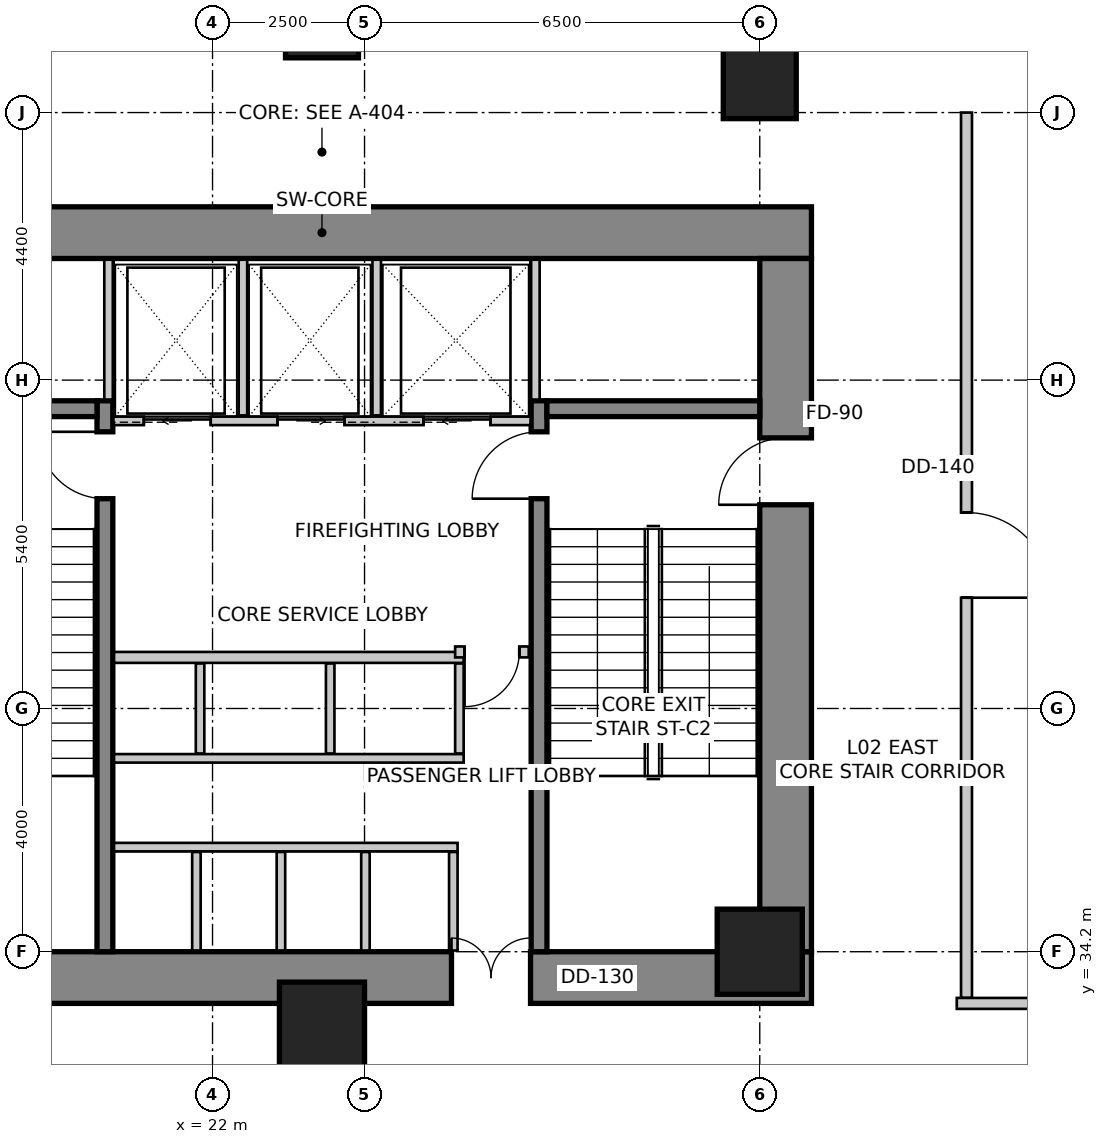
"""IFC4 building model, lengths in metres.
Left out: names, types, materials, properties, quantities, classifications, styles, units other than length and angle.
Written with IfcOpenShell. Run it as: python <this file> out.ifc"""

import sys

from ifc_helpers import new_model, si_unit, direction, frame, frame_2d, origin, origin_2d, place, context, subcontext, project, spatial, rectangle, extrude, source, transform, mapped, element, fill, save


model = new_model("IFC4")
c1 = context("Model", 3, precision=1e-05, world=origin(), true_north=direction((0.0, 1.0)))
c2 = subcontext(c1, "Body", "Model", "MODEL_VIEW")
j1 = project(units=[si_unit("LENGTHUNIT", "METRE"), si_unit("PLANEANGLEUNIT", "RADIAN")], contexts=[c1])
p1 = place(None, origin())
s1 = spatial("IfcSite", under=j1, at=p1, CompositionType="ELEMENT")
p2 = place(p1, origin())
s2 = spatial("IfcBuilding", under=s1, at=p2, CompositionType="ELEMENT")
p3 = place(p2, frame((0.0, 0.0, 6.0)))
s3 = spatial("IfcBuildingStorey", under=s2, at=p3, CompositionType="ELEMENT", Elevation=6.0)
p4 = place(p3, frame((15.75, 46.025, 0.0), z_axis=(0.0, 0.0, 1.0), x_axis=(1.0, 0.0, 0.0)))
e1 = element("IfcWall", 1, at=p4, inside=s3, PredefinedType="SHEAR", context=c2, shape_type="SweptSolid", body=[
    extrude(rectangle(XDim=16.1, YDim=0.85, at=frame_2d((8.05, 0.0))), origin(), (0.0, 0.0, 1.0), 5.2),
])
p5 = place(p3, frame((15.75, 33.775, 0.0), z_axis=(0.0, 0.0, 1.0), x_axis=(1.0, 0.0, 0.0)))
e2 = element("IfcWall", 2, at=p5, inside=s3, PredefinedType="SHEAR", context=c2, shape_type="SweptSolid", body=[
    extrude(rectangle(XDim=16.1, YDim=0.85, at=frame_2d((8.05, 0.0))), origin(), (0.0, 0.0, 1.0), 5.2),
])
m1 = source(origin(), c2, "Body", "SweptSolid", [
    extrude(rectangle(XDim=1.3, YDim=2.15, at=frame_2d((0.65, 1.075))), frame((0.0, 0.435, 0.0), z_axis=(0.0, -1.0, 0.0), x_axis=(1.0, 0.0, 0.0)), (0.0, 0.0, 1.0), 0.87),
])
p6 = place(p5, frame((10.18, 0.0, 0.0)))
e3 = element("IfcOpeningElement", 3, at=p6, cuts=e2, PredefinedType="OPENING", context=c2, shape_type="MappedRepresentation", body=[
    mapped(m1, transform((0.0, 0.0, 0.0), scale=1.0)),
])
p7 = place(p3, frame((31.425, 34.2, 0.0), z_axis=(0.0, 0.0, 1.0), x_axis=(0.0, 1.0, 0.0)))
e4 = element("IfcWall", 4, at=p7, inside=s3, PredefinedType="SHEAR", context=c2, shape_type="SweptSolid", body=[
    extrude(rectangle(XDim=11.4, YDim=0.85, at=frame_2d((5.7, 0.0))), origin(), (0.0, 0.0, 1.0), 5.2),
])
m2 = source(origin(), c2, "Body", "SweptSolid", [
    extrude(rectangle(XDim=1.1, YDim=2.15, at=frame_2d((0.55, 1.075))), frame((0.0, 0.435, 0.0), z_axis=(0.0, -1.0, 0.0), x_axis=(1.0, 0.0, 0.0)), (0.0, 0.0, 1.0), 0.87),
])
p8 = place(p7, frame((7.35, 0.0, 0.0)))
e5 = element("IfcOpeningElement", 5, at=p8, cuts=e4, PredefinedType="OPENING", context=c2, shape_type="MappedRepresentation", body=[
    mapped(m2, transform((0.0, 0.0, 0.0), scale=1.0)),
])
p9 = place(p3, frame((20.23, 34.2, 0.0), z_axis=(0.0, 0.0, 1.0), x_axis=(0.0, 1.0, 0.0)))
e6 = element("IfcWall", 6, at=p9, inside=s3, PredefinedType="SHEAR", context=c2, shape_type="SweptSolid", body=[
    extrude(rectangle(XDim=9.06, YDim=0.26, at=frame_2d((4.53, 0.0))), origin(), (0.0, 0.0, 1.0), 5.2),
])
m3 = source(origin(), c2, "Body", "SweptSolid", [
    extrude(rectangle(XDim=1.1, YDim=2.15, at=frame_2d((0.55, 1.075))), frame((0.0, 0.14, 0.0), z_axis=(0.0, -1.0, 0.0), x_axis=(1.0, 0.0, 0.0)), (0.0, 0.0, 1.0), 0.28),
])
p10 = place(p9, frame((7.45, 0.0, 0.0)))
e7 = element("IfcOpeningElement", 7, at=p10, cuts=e6, PredefinedType="OPENING", context=c2, shape_type="MappedRepresentation", body=[
    mapped(m3, transform((0.0, 0.0, 0.0), scale=1.0)),
])
p11 = place(p3, frame((27.37, 34.2, 0.0), z_axis=(0.0, 0.0, 1.0), x_axis=(0.0, 1.0, 0.0)))
e8 = element("IfcWall", 8, at=p11, inside=s3, PredefinedType="SHEAR", context=c2, shape_type="SweptSolid", body=[
    extrude(rectangle(XDim=9.06, YDim=0.26, at=frame_2d((4.53, 0.0))), origin(), (0.0, 0.0, 1.0), 5.2),
])
p12 = place(p11, frame((7.45, 0.0, 0.0)))
e9 = element("IfcOpeningElement", 9, at=p12, cuts=e8, PredefinedType="OPENING", context=c2, shape_type="MappedRepresentation", body=[
    mapped(m3, transform((0.0, 0.0, 0.0), scale=1.0)),
])
for number, where, z_axis, x_axis in (
    (10, (16.6, 43.13, 0.0), (0.0, 0.0, 1.0), (1.0, 0.0, 0.0)),
    (11, (27.5, 43.13, 0.0), (0.0, 0.0, 1.0), (1.0, 0.0, 0.0)),
):
    element("IfcWall", number, at=place(p3, frame(where, z_axis=z_axis, x_axis=x_axis)), inside=s3, PredefinedType="SHEAR", context=c2, shape_type="SweptSolid", body=[
        extrude(rectangle(XDim=3.5, YDim=0.26, at=frame_2d((1.75, 0.0))), origin(), (0.0, 0.0, 1.0), 5.2),
    ])
m4 = source(origin(), c2, "Body", "SweptSolid", [
    extrude(rectangle(XDim=1.4, YDim=1.4, at=origin_2d()), origin(), (0.0, 0.0, 1.0), 5.2),
])
for number, where, z_axis, x_axis in (
    (12, (23.8, 33.0, 0.0), (0.0, 0.0, 1.0), (1.0, 0.0, 0.0)),
    (13, (31.0, 34.2, 0.0), (0.0, 0.0, 1.0), (1.0, 0.0, 0.0)),
):
    element("IfcColumn", number, at=place(p3, frame(where, z_axis=z_axis, x_axis=x_axis)), inside=s3, PredefinedType="COLUMN", context=c2, shape_type="MappedRepresentation", body=[
        mapped(m4, transform((0.0, 0.0, 0.0), scale=1.0)),
    ])
m5 = source(origin(), c2, "Body", "SweptSolid", [
    extrude(rectangle(XDim=1.2, YDim=1.2, at=origin_2d()), origin(), (0.0, 0.0, 1.0), 5.2),
])
for number, where, z_axis, x_axis in (
    (14, (23.8, 49.5, 0.0), (0.0, 0.0, 1.0), (1.0, 0.0, 0.0)),
    (15, (31.0, 48.5, 0.0), (0.0, 0.0, 1.0), (1.0, 0.0, 0.0)),
):
    element("IfcColumn", number, at=place(p3, frame(where, z_axis=z_axis, x_axis=x_axis)), inside=s3, PredefinedType="COLUMN", context=c2, shape_type="MappedRepresentation", body=[
        mapped(m5, transform((0.0, 0.0, 0.0), scale=1.0)),
    ])
p13 = place(p3, frame((20.37, 42.93, 0.0), z_axis=(0.0, 0.0, 1.0), x_axis=(1.0, 0.0, 0.0)))
e16 = element("IfcWall", 16, at=p13, inside=s3, PredefinedType="SOLIDWALL", context=c2, shape_type="SweptSolid", body=[
    extrude(rectangle(XDim=6.86, YDim=0.14, at=frame_2d((3.43, 0.0))), origin(), (0.0, 0.0, 1.0), 4.9),
])
m6 = source(origin(), c2, "Body", "SweptSolid", [
    extrude(rectangle(XDim=1.1, YDim=2.15, at=frame_2d((0.55, 1.075))), frame((0.0, 0.08, 0.0), z_axis=(0.0, -1.0, 0.0), x_axis=(1.0, 0.0, 0.0)), (0.0, 0.0, 1.0), 0.16),
])
p14 = place(p13, frame((0.5, 0.0, 0.0)))
e17 = element("IfcOpeningElement", 17, at=p14, cuts=e16, PredefinedType="OPENING", context=c2, shape_type="MappedRepresentation", body=[
    mapped(m6, transform((0.0, 0.0, 0.0), scale=1.0)),
])
p15 = place(p13, frame((2.7, 0.0, 0.0)))
e18 = element("IfcOpeningElement", 18, at=p15, cuts=e16, PredefinedType="OPENING", context=c2, shape_type="MappedRepresentation", body=[
    mapped(m6, transform((0.0, 0.0, 0.0), scale=1.0)),
])
p16 = place(p13, frame((5.1, 0.0, 0.0)))
e19 = element("IfcOpeningElement", 19, at=p16, cuts=e16, PredefinedType="OPENING", context=c2, shape_type="MappedRepresentation", body=[
    mapped(m6, transform((0.0, 0.0, 0.0), scale=1.0)),
])
for number, where, z_axis, x_axis in (
    (20, (20.29, 43.28, 0.0), (0.0, 0.0, 1.0), (0.0, 1.0, 0.0)),
    (21, (27.31, 43.28, 0.0), (0.0, 0.0, 1.0), (0.0, 1.0, 0.0)),
):
    element("IfcWall", number, at=place(p3, frame(where, z_axis=z_axis, x_axis=x_axis)), inside=s3, PredefinedType="SOLIDWALL", context=c2, shape_type="SweptSolid", body=[
        extrude(rectangle(XDim=2.3, YDim=0.14, at=frame_2d((1.15, 0.0))), origin(), (0.0, 0.0, 1.0), 4.9),
    ])
for number, where, z_axis, x_axis in (
    (22, (22.5, 43.02, 0.0), (0.0, 0.0, 1.0), (0.0, 1.0, 0.0)),
    (23, (24.7, 43.02, 0.0), (0.0, 0.0, 1.0), (0.0, 1.0, 0.0)),
):
    element("IfcWall", number, at=place(p3, frame(where, z_axis=z_axis, x_axis=x_axis)), inside=s3, PredefinedType="SOLIDWALL", context=c2, shape_type="SweptSolid", body=[
        extrude(rectangle(XDim=2.56, YDim=0.14, at=frame_2d((1.28, 0.0))), origin(), (0.0, 0.0, 1.0), 4.9),
    ])
p17 = place(p3, frame((20.38, 35.92, 0.0), z_axis=(0.0, 0.0, 1.0), x_axis=(1.0, 0.0, 0.0)))
e24 = element("IfcWall", 24, at=p17, inside=s3, PredefinedType="SOLIDWALL", context=c2, shape_type="SweptSolid", body=[
    extrude(rectangle(XDim=5.65, YDim=0.14, at=frame_2d((2.825, 0.0))), origin(), (0.0, 0.0, 1.0), 4.9),
])
for number, where, z_axis, x_axis in (
    (25, (25.96, 34.22, 0.0), (0.0, 0.0, 1.0), (0.0, 1.0, 0.0)),
    (26, (21.735, 34.22, 0.0), (0.0, 0.0, 1.0), (0.0, 1.0, 0.0)),
    (27, (23.125, 34.22, 0.0), (0.0, 0.0, 1.0), (0.0, 1.0, 0.0)),
    (28, (24.515, 34.22, 0.0), (0.0, 0.0, 1.0), (0.0, 1.0, 0.0)),
):
    element("IfcWall", number, at=place(p3, frame(where, z_axis=z_axis, x_axis=x_axis)), inside=s3, PredefinedType="SOLIDWALL", context=c2, shape_type="SweptSolid", body=[
        extrude(rectangle(XDim=1.62, YDim=0.14, at=frame_2d((0.81, 0.0))), origin(), (0.0, 0.0, 1.0), 4.9),
    ])
p18 = place(p3, frame((20.38, 37.38, 0.0), z_axis=(0.0, 0.0, 1.0), x_axis=(1.0, 0.0, 0.0)))
e29 = element("IfcWall", 29, at=p18, inside=s3, PredefinedType="SOLIDWALL", context=c2, shape_type="SweptSolid", body=[
    extrude(rectangle(XDim=5.75, YDim=0.14, at=frame_2d((2.875, 0.0))), origin(), (0.0, 0.0, 1.0), 4.9),
])
p19 = place(p3, frame((20.38, 39.04, 0.0), z_axis=(0.0, 0.0, 1.0), x_axis=(1.0, 0.0, 0.0)))
e30 = element("IfcWall", 30, at=p19, inside=s3, PredefinedType="SOLIDWALL", context=c2, shape_type="SweptSolid", body=[
    extrude(rectangle(XDim=5.75, YDim=0.18, at=frame_2d((2.875, 0.0))), origin(), (0.0, 0.0, 1.0), 4.9),
])
for number, where, z_axis, x_axis in (
    (31, (26.06, 37.46, 0.0), (0.0, 0.0, 1.0), (0.0, 1.0, 0.0)),
    (32, (21.795, 37.46, 0.0), (0.0, 0.0, 1.0), (0.0, 1.0, 0.0)),
    (33, (23.935, 37.46, 0.0), (0.0, 0.0, 1.0), (0.0, 1.0, 0.0)),
):
    element("IfcWall", number, at=place(p3, frame(where, z_axis=z_axis, x_axis=x_axis)), inside=s3, PredefinedType="SOLIDWALL", context=c2, shape_type="SweptSolid", body=[
        extrude(rectangle(XDim=1.48, YDim=0.14, at=frame_2d((0.74, 0.0))), origin(), (0.0, 0.0, 1.0), 4.9),
    ])
p20 = place(p3, frame((27.2, 39.13, 0.0), z_axis=(0.0, 0.0, 1.0), x_axis=(-1.0, 0.0, 0.0)))
e34 = element("IfcWall", 34, at=p20, inside=s3, PredefinedType="PARTITIONING", context=c2, shape_type="SweptSolid", body=[
    extrude(rectangle(XDim=1.21, YDim=0.18, at=frame_2d((0.605, 0.0))), origin(), (0.0, 0.0, 1.0), 4.9),
])
m7 = source(origin(), c2, "Body", "SweptSolid", [
    extrude(rectangle(XDim=0.9, YDim=2.15, at=frame_2d((0.45, 1.075))), frame((0.0, 0.1, 0.0), z_axis=(0.0, -1.0, 0.0), x_axis=(1.0, 0.0, 0.0)), (0.0, 0.0, 1.0), 0.2),
])
p21 = place(p20, frame((0.155, 0.0, 0.0)))
e35 = element("IfcOpeningElement", 35, at=p21, cuts=e34, PredefinedType="OPENING", context=c2, shape_type="MappedRepresentation", body=[
    mapped(m7, transform((0.0, 0.0, 0.0), scale=1.0)),
])
p22 = place(p3, frame((34.24, 33.35, 0.0), z_axis=(0.0, 0.0, 1.0), x_axis=(1.0, 0.0, 0.0)))
e36 = element("IfcWall", 36, at=p22, inside=s3, PredefinedType="PARTITIONING", context=c2, shape_type="SweptSolid", body=[
    extrude(rectangle(XDim=33.495, YDim=0.18, at=frame_2d((16.748, 0.0))), origin(), (0.0, 0.0, 1.0), 3.092),
])
p23 = place(p3, frame((34.4, 48.0, 0.0), z_axis=(0.0, 0.0, 1.0), x_axis=(0.0, -1.0, 0.0)))
e37 = element("IfcWall", 37, at=p23, inside=s3, PredefinedType="PARTITIONING", context=c2, shape_type="SweptSolid", body=[
    extrude(rectangle(XDim=14.556, YDim=0.18, at=frame_2d((7.278, 0.0))), origin(), (0.0, 0.0, 1.0), 3.942),
])
m8 = source(origin(), c2, "Body", "SweptSolid", [
    extrude(rectangle(XDim=1.4, YDim=2.15, at=frame_2d((0.7, 1.075))), frame((0.0, 0.1, 0.0), z_axis=(0.0, -1.0, 0.0), x_axis=(1.0, 0.0, 0.0)), (0.0, 0.0, 1.0), 0.2),
])
p24 = place(p23, frame((6.578, 0.0, 0.0)))
e38 = element("IfcOpeningElement", 38, at=p24, cuts=e37, PredefinedType="OPENING", context=c2, shape_type="MappedRepresentation", body=[
    mapped(m8, transform((0.0, 0.0, 0.0), scale=1.0)),
])
m9 = source(origin(), c2, "Body", "SweptSolid", [
    extrude(rectangle(XDim=1.1, YDim=2.15, at=frame_2d((0.55, 1.075))), frame((0.0, 0.025, 0.0), z_axis=(0.0, -1.0, 0.0), x_axis=(1.0, 0.0, 0.0)), (0.0, 0.0, 1.0), 0.05),
])
p25 = place(p14, origin())
e39 = element("IfcDoor", 39, at=p25, inside=s3, OperationType="SLIDING_TO_LEFT", PredefinedType="DOOR", context=c2, shape_type="MappedRepresentation", body=[
    mapped(m9, transform((0.0, 0.0, 0.0), scale=1.0)),
])
fill(e17, e39)
p26 = place(p15, origin())
e40 = element("IfcDoor", 40, at=p26, inside=s3, OperationType="SLIDING_TO_RIGHT", PredefinedType="DOOR", context=c2, shape_type="MappedRepresentation", body=[
    mapped(m9, transform((0.0, 0.0, 0.0), scale=1.0)),
])
fill(e18, e40)
m10 = source(origin(), c2, "Body", "SweptSolid", [
    extrude(rectangle(XDim=1.1, YDim=2.15, at=frame_2d((0.55, 1.075))), frame((0.0, 0.025, 0.0), z_axis=(0.0, -1.0, 0.0), x_axis=(1.0, 0.0, 0.0)), (0.0, 0.0, 1.0), 0.05),
])
p27 = place(p16, origin())
e41 = element("IfcDoor", 41, at=p27, inside=s3, OperationType="SLIDING_TO_LEFT", PredefinedType="DOOR", context=c2, shape_type="MappedRepresentation", body=[
    mapped(m10, transform((0.0, 0.0, 0.0), scale=1.0)),
])
fill(e19, e41)
m11 = source(origin(), c2, "Body", "SweptSolid", [
    extrude(rectangle(XDim=1.1, YDim=2.15, at=frame_2d((0.55, 1.075))), frame((0.0, 0.025, 0.0), z_axis=(0.0, -1.0, 0.0), x_axis=(1.0, 0.0, 0.0)), (0.0, 0.0, 1.0), 0.05),
])
p28 = place(p10, origin())
e42 = element("IfcDoor", 42, at=p28, inside=s3, OperationType="SINGLE_SWING_RIGHT", PredefinedType="DOOR", context=c2, shape_type="MappedRepresentation", body=[
    mapped(m11, transform((0.0, 0.0, 0.0), scale=1.0)),
])
fill(e7, e42)
p29 = place(p12, origin())
e43 = element("IfcDoor", 43, at=p29, inside=s3, OperationType="SINGLE_SWING_LEFT", PredefinedType="DOOR", context=c2, shape_type="MappedRepresentation", body=[
    mapped(m11, transform((0.0, 0.0, 0.0), scale=1.0)),
])
fill(e9, e43)
p30 = place(p8, origin())
e44 = element("IfcDoor", 44, at=p30, inside=s3, OperationType="SINGLE_SWING_LEFT", PredefinedType="DOOR", context=c2, shape_type="MappedRepresentation", body=[
    mapped(m11, transform((0.0, 0.0, 0.0), scale=1.0)),
])
fill(e5, e44)
m12 = source(origin(), c2, "Body", "SweptSolid", [
    extrude(rectangle(XDim=1.3, YDim=2.15, at=frame_2d((0.65, 1.075))), frame((0.0, 0.025, 0.0), z_axis=(0.0, -1.0, 0.0), x_axis=(1.0, 0.0, 0.0)), (0.0, 0.0, 1.0), 0.05),
])
p31 = place(p6, origin())
e45 = element("IfcDoor", 45, at=p31, inside=s3, OperationType="DOUBLE_DOOR_SINGLE_SWING", PredefinedType="DOOR", context=c2, shape_type="MappedRepresentation", body=[
    mapped(m12, transform((0.0, 0.0, 0.0), scale=1.0)),
])
fill(e3, e45)
m13 = source(origin(), c2, "Body", "SweptSolid", [
    extrude(rectangle(XDim=0.9, YDim=2.15, at=frame_2d((0.45, 1.075))), frame((0.0, 0.025, 0.0), z_axis=(0.0, -1.0, 0.0), x_axis=(1.0, 0.0, 0.0)), (0.0, 0.0, 1.0), 0.05),
])
p32 = place(p21, origin())
e46 = element("IfcDoor", 46, at=p32, inside=s3, OperationType="SINGLE_SWING_RIGHT", PredefinedType="DOOR", context=c2, shape_type="MappedRepresentation", body=[
    mapped(m13, transform((0.0, 0.0, 0.0), scale=1.0)),
])
fill(e35, e46)
m14 = source(origin(), c2, "Body", "SweptSolid", [
    extrude(rectangle(XDim=1.4, YDim=2.15, at=frame_2d((0.7, 1.075))), frame((0.0, 0.025, 0.0), z_axis=(0.0, -1.0, 0.0), x_axis=(1.0, 0.0, 0.0)), (0.0, 0.0, 1.0), 0.05),
])
p33 = place(p24, origin())
e47 = element("IfcDoor", 47, at=p33, inside=s3, OperationType="SINGLE_SWING_RIGHT", PredefinedType="DOOR", context=c2, shape_type="MappedRepresentation", body=[
    mapped(m14, transform((0.0, 0.0, 0.0), scale=1.0)),
])
fill(e38, e47)
save(model, sys.argv[1])
